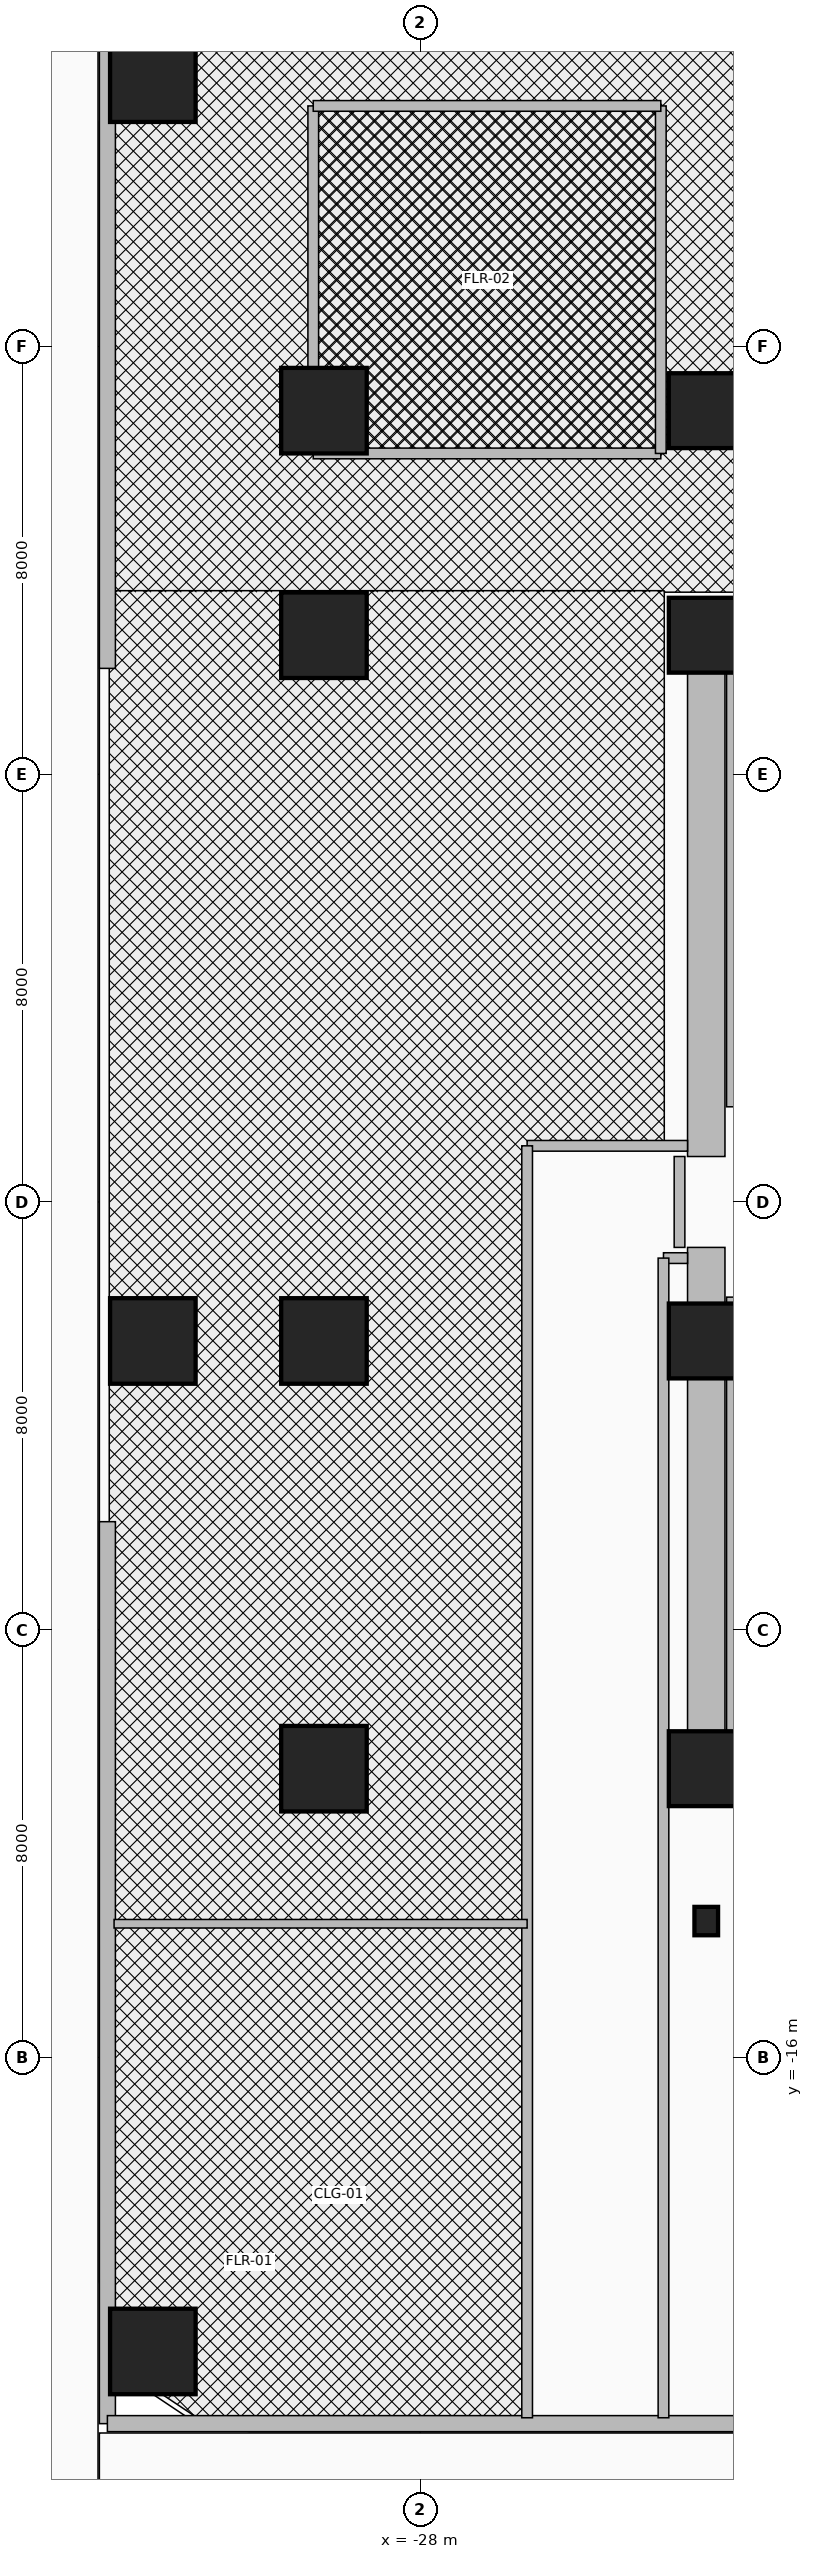
"""IFC4 building model, lengths in metres.
Left out: names, types, materials, properties, quantities, classifications, styles, units other than length and angle.
Written with IfcOpenShell. Run it as: python <this file> out.ifc"""

import sys

from ifc_helpers import new_model, si_unit, direction, frame, frame_2d, origin, origin_2d, place, context, subcontext, project, spatial, rectangle, i_section, extrude, source, transform, mapped, element, fill, save


model = new_model("IFC4")
c1 = context("Model", 3, precision=1e-05, world=origin(), true_north=direction((0.0, 1.0)))
c2 = subcontext(c1, "Body", "Model", "MODEL_VIEW")
j1 = project(units=[si_unit("LENGTHUNIT", "METRE"), si_unit("PLANEANGLEUNIT", "RADIAN")], contexts=[c1])
p1 = place(None, origin())
s1 = spatial("IfcSite", under=j1, at=p1, CompositionType="ELEMENT")
p2 = place(p1, origin())
s2 = spatial("IfcBuilding", under=s1, at=p2, CompositionType="ELEMENT")
p3 = place(p2, origin())
s3 = spatial("IfcBuildingStorey", under=s2, at=p3, CompositionType="ELEMENT", Elevation=0.0)
for number, where, z_axis, x_axis in (
    (1, (-22.16, 1.78, 0.0), (0.0, 0.0, 1.0), (0.0, 1.0, 0.0)),
    (2, (-22.16, -10.45, 0.0), (0.0, 0.0, 1.0), (0.0, 1.0, 0.0)),
):
    element("IfcWall", number, at=place(p3, frame(where, z_axis=z_axis, x_axis=x_axis)), inside=s3, PredefinedType="SHEAR", context=c2, shape_type="SweptSolid", body=[
        extrude(rectangle(XDim=8.67, YDim=0.22, at=frame_2d((4.335, 0.0))), origin(), (0.0, 0.0, 1.0), 4.92),
    ])
for number, where, z_axis, x_axis in (
    (3, (-22.65, -11.15, 0.0), (0.0, 0.0, 1.0), (0.0, 1.0, 0.0)),
    (4, (-22.65, 0.85, 0.0), (0.0, 0.0, 1.0), (0.0, 1.0, 0.0)),
):
    element("IfcWall", number, at=place(p3, frame(where, z_axis=z_axis, x_axis=x_axis)), inside=s3, PredefinedType="SHEAR", context=c2, shape_type="SweptSolid", body=[
        extrude(rectangle(XDim=10.3, YDim=0.7, at=frame_2d((5.15, 0.0))), origin(), (0.0, 0.0, 1.0), 4.92),
    ])
for number, where, z_axis, x_axis in (
    (5, (-22.65, 10.8, 0.0), (0.0, 0.0, 1.0), (1.0, 0.0, 0.0)),
    (6, (-22.65, -10.8, 0.0), (0.0, 0.0, 1.0), (1.0, 0.0, 0.0)),
):
    element("IfcWall", number, at=place(p3, frame(where, z_axis=z_axis, x_axis=x_axis)), inside=s3, PredefinedType="SHEAR", context=c2, shape_type="SweptSolid", body=[
        extrude(rectangle(XDim=10.25, YDim=0.7, at=frame_2d((5.125, 0.0))), origin(), (0.0, 0.0, 1.0), 4.92),
    ])
m1 = source(origin(), c2, "Body", "SweptSolid", [
    extrude(rectangle(XDim=1.6, YDim=1.6, at=origin_2d()), origin(), (0.0, 0.0, 1.0), 5.2),
])
p4 = place(p3, frame((-29.8, -10.6, 0.0), z_axis=(0.0, 0.0, 1.0), x_axis=(1.0, 0.0, 0.0)))
e7 = element("IfcColumn", 7, at=p4, inside=s3, PredefinedType="COLUMN", context=c2, shape_type="MappedRepresentation", body=[
    mapped(m1, transform((0.0, 0.0, 0.0), x_axis=(1.0, 0.0, 0.0), y_axis=(0.0, 1.0, 0.0), z_axis=(0.0, 0.0, 1.0), scale=1.0)),
])
m2 = source(origin(), c2, "Body", "SweptSolid", [
    extrude(rectangle(XDim=1.4, YDim=1.4, at=origin_2d()), origin(), (0.0, 0.0, 1.0), 5.2),
])
p5 = place(p3, frame((-22.65, -10.6, 0.0), z_axis=(0.0, 0.0, 1.0), x_axis=(1.0, 0.0, 0.0)))
e8 = element("IfcColumn", 8, at=p5, inside=s3, PredefinedType="COLUMN", context=c2, shape_type="MappedRepresentation", body=[
    mapped(m2, transform((0.0, 0.0, 0.0), x_axis=(1.0, 0.0, 0.0), y_axis=(0.0, 1.0, 0.0), z_axis=(0.0, 0.0, 1.0), scale=1.0)),
])
p6 = place(p3, frame((-29.8, -2.6, 0.0), z_axis=(0.0, 0.0, 1.0), x_axis=(1.0, 0.0, 0.0)))
e9 = element("IfcColumn", 9, at=p6, inside=s3, PredefinedType="COLUMN", context=c2, shape_type="MappedRepresentation", body=[
    mapped(m1, transform((0.0, 0.0, 0.0), x_axis=(1.0, 0.0, 0.0), y_axis=(0.0, 1.0, 0.0), z_axis=(0.0, 0.0, 1.0), scale=1.0)),
])
p7 = place(p3, frame((-22.65, -2.6, 0.0), z_axis=(0.0, 0.0, 1.0), x_axis=(1.0, 0.0, 0.0)))
e10 = element("IfcColumn", 10, at=p7, inside=s3, PredefinedType="COLUMN", context=c2, shape_type="MappedRepresentation", body=[
    mapped(m2, transform((0.0, 0.0, 0.0), x_axis=(1.0, 0.0, 0.0), y_axis=(0.0, 1.0, 0.0), z_axis=(0.0, 0.0, 1.0), scale=1.0)),
])
p8 = place(p3, frame((-29.8, 10.6, 0.0), z_axis=(0.0, 0.0, 1.0), x_axis=(1.0, 0.0, 0.0)))
e11 = element("IfcColumn", 11, at=p8, inside=s3, PredefinedType="COLUMN", context=c2, shape_type="MappedRepresentation", body=[
    mapped(m1, transform((0.0, 0.0, 0.0), x_axis=(1.0, 0.0, 0.0), y_axis=(0.0, 1.0, 0.0), z_axis=(0.0, 0.0, 1.0), scale=1.0)),
])
p9 = place(p3, frame((-22.65, 10.6, 0.0), z_axis=(0.0, 0.0, 1.0), x_axis=(1.0, 0.0, 0.0)))
e12 = element("IfcColumn", 12, at=p9, inside=s3, PredefinedType="COLUMN", context=c2, shape_type="MappedRepresentation", body=[
    mapped(m2, transform((0.0, 0.0, 0.0), x_axis=(1.0, 0.0, 0.0), y_axis=(0.0, 1.0, 0.0), z_axis=(0.0, 0.0, 1.0), scale=1.0)),
])
p10 = place(p3, frame((-29.8, 14.8, 0.0), z_axis=(0.0, 0.0, 1.0), x_axis=(1.0, 0.0, 0.0)))
e13 = element("IfcColumn", 13, at=p10, inside=s3, PredefinedType="COLUMN", context=c2, shape_type="MappedRepresentation", body=[
    mapped(m1, transform((0.0, 0.0, 0.0), x_axis=(1.0, 0.0, 0.0), y_axis=(0.0, 1.0, 0.0), z_axis=(0.0, 0.0, 1.0), scale=1.0)),
])
p11 = place(p3, frame((-22.65, 14.8, 0.0), z_axis=(0.0, 0.0, 1.0), x_axis=(1.0, 0.0, 0.0)))
e14 = element("IfcColumn", 14, at=p11, inside=s3, PredefinedType="COLUMN", context=c2, shape_type="MappedRepresentation", body=[
    mapped(m2, transform((0.0, 0.0, 0.0), x_axis=(1.0, 0.0, 0.0), y_axis=(0.0, 1.0, 0.0), z_axis=(0.0, 0.0, 1.0), scale=1.0)),
])
m3 = source(origin(), c2, "Body", "SweptSolid", [
    extrude(i_section(OverallWidth=0.442, OverallDepth=0.531, WebThickness=0.066, FlangeThickness=0.106, at=origin_2d()), origin(), (0.0, 0.0, 1.0), 5.2),
])
p12 = place(p3, frame((-22.65, -13.45, 0.0), z_axis=(0.0, 0.0, 1.0), x_axis=(1.0, 0.0, 0.0)))
e15 = element("IfcColumn", 15, at=p12, inside=s3, PredefinedType="COLUMN", context=c2, shape_type="MappedRepresentation", body=[
    mapped(m3, transform((0.0, 0.0, 0.0), x_axis=(1.0, 0.0, 0.0), y_axis=(0.0, 1.0, 0.0), z_axis=(0.0, 0.0, 1.0), scale=1.0)),
])
for number, where, z_axis, x_axis in (
    (16, (-33.0, -21.5, 0.0), (0.0, 0.0, 1.0), (1.0, 0.0, 0.0)),
    (17, (-33.0, -2.6, 0.0), (0.0, 0.0, 1.0), (1.0, 0.0, 0.0)),
    (18, (-33.0, 21.0, 0.0), (0.0, 0.0, 1.0), (1.0, 0.0, 0.0)),
):
    element("IfcColumn", number, at=place(p3, frame(where, z_axis=z_axis, x_axis=x_axis)), inside=s3, PredefinedType="COLUMN", context=c2, shape_type="MappedRepresentation", body=[
        mapped(m1, transform((0.0, 0.0, 0.0), x_axis=(1.0, 0.0, 0.0), y_axis=(0.0, 1.0, 0.0), z_axis=(0.0, 0.0, 1.0), scale=1.0)),
    ])
p13 = place(p3, frame((-33.85, -22.85, 0.0), z_axis=(0.0, 0.0, 1.0), x_axis=(0.0, 1.0, 0.0)))
e19 = element("IfcWall", 19, at=p13, inside=s3, PredefinedType="SOLIDWALL", context=c2, shape_type="SweptSolid", body=[
    extrude(rectangle(XDim=16.87, YDim=0.3, at=frame_2d((8.435, 0.0))), origin(), (0.0, 0.0, 1.0), 4.92),
])
p14 = place(p13, frame((11.2, 0.0, 0.0)))
e20 = element("IfcOpeningElement", 20, at=p14, cuts=e19, PredefinedType="OPENING", context=c2, shape_type="SweptSolid", body=[
    extrude(rectangle(XDim=1.8, YDim=2.2, at=frame_2d((0.9, 1.1))), frame((0.0, 0.165, 0.0), z_axis=(0.0, -1.0, 0.0), x_axis=(1.0, 0.0, 0.0)), (0.0, 0.0, 1.0), 0.33),
])
p15 = place(p3, frame((-33.85, 9.98, 0.0), z_axis=(0.0, 0.0, 1.0), x_axis=(0.0, 1.0, 0.0)))
e21 = element("IfcWall", 21, at=p15, inside=s3, PredefinedType="SOLIDWALL", context=c2, shape_type="SweptSolid", body=[
    extrude(rectangle(XDim=12.87, YDim=0.3, at=frame_2d((6.435, 0.0))), origin(), (0.0, 0.0, 1.0), 4.92),
])
p16 = place(p3, frame((-33.85, -22.85, 0.0), z_axis=(0.0, 0.0, 1.0), x_axis=(1.0, 0.0, 0.0)))
e22 = element("IfcWall", 22, at=p16, inside=s3, PredefinedType="SOLIDWALL", context=c2, shape_type="SweptSolid", body=[
    extrude(rectangle(XDim=21.7, YDim=0.3, at=frame_2d((10.85, 0.0))), origin(), (0.0, 0.0, 1.0), 4.92),
])
p17 = place(p16, frame((3.2, 0.0, 0.0)))
e23 = element("IfcOpeningElement", 23, at=p17, cuts=e22, PredefinedType="OPENING", context=c2, shape_type="SweptSolid", body=[
    extrude(rectangle(XDim=2.2, YDim=2.45, at=frame_2d((1.1, 1.225))), frame((0.0, 0.165, 0.0), z_axis=(0.0, -1.0, 0.0), x_axis=(1.0, 0.0, 0.0)), (0.0, 0.0, 1.0), 0.33),
])
p18 = place(p16, frame((8.225, 0.0, 0.0)))
e24 = element("IfcOpeningElement", 24, at=p18, cuts=e22, PredefinedType="OPENING", context=c2, shape_type="SweptSolid", body=[
    extrude(rectangle(XDim=1.8, YDim=2.2, at=frame_2d((0.9, 1.1))), frame((0.0, 0.165, 0.0), z_axis=(0.0, -1.0, 0.0), x_axis=(1.0, 0.0, 0.0)), (0.0, 0.0, 1.0), 0.33),
])
p19 = place(p3, frame((-23.15, -0.85, 0.0), z_axis=(0.0, 0.0, 1.0), x_axis=(0.0, 1.0, 0.0)))
e25 = element("IfcWall", 25, at=p19, inside=s3, PredefinedType="PARTITIONING", context=c2, shape_type="SweptSolid", body=[
    extrude(rectangle(XDim=1.7, YDim=0.2, at=frame_2d((0.85, 0.0))), origin(), (0.0, 0.0, 1.0), 4.439),
])
p20 = place(p19, frame((0.325, 0.0, 0.0)))
e26 = element("IfcOpeningElement", 26, at=p20, cuts=e25, PredefinedType="OPENING", context=c2, shape_type="SweptSolid", body=[
    extrude(rectangle(XDim=1.05, YDim=2.15, at=frame_2d((0.525, 1.075))), frame((0.0, 0.115, 0.0), z_axis=(0.0, -1.0, 0.0), x_axis=(1.0, 0.0, 0.0)), (0.0, 0.0, 1.0), 0.23),
])
p21 = place(p3, frame((-26.0, 1.05, 0.0), z_axis=(0.0, 0.0, 1.0), x_axis=(1.0, 0.0, 0.0)))
e27 = element("IfcWall", 27, at=p21, inside=s3, PredefinedType="PARTITIONING", context=c2, shape_type="SweptSolid", body=[
    extrude(rectangle(XDim=3.0, YDim=0.2, at=frame_2d((1.5, 0.0))), origin(), (0.0, 0.0, 1.0), 4.92),
])
p22 = place(p3, frame((-23.45, -1.05, 0.0), z_axis=(0.0, 0.0, 1.0), x_axis=(1.0, 0.0, 0.0)))
e28 = element("IfcWall", 28, at=p22, inside=s3, PredefinedType="PARTITIONING", context=c2, shape_type="SweptSolid", body=[
    extrude(rectangle(XDim=0.45, YDim=0.2, at=frame_2d((0.225, 0.0))), origin(), (0.0, 0.0, 1.0), 4.92),
])
p23 = place(p3, frame((-26.0, -22.74, 0.0), z_axis=(0.0, 0.0, 1.0), x_axis=(0.0, 1.0, 0.0)))
e29 = element("IfcWall", 29, at=p23, inside=s3, PredefinedType="PARTITIONING", context=c2, shape_type="SweptSolid", body=[
    extrude(rectangle(XDim=23.79, YDim=0.2, at=frame_2d((11.895, 0.0))), origin(), (0.0, 0.0, 1.0), 3.957),
])
p24 = place(p3, frame((-23.45, -22.74, 0.0), z_axis=(0.0, 0.0, 1.0), x_axis=(0.0, 1.0, 0.0)))
e30 = element("IfcWall", 30, at=p24, inside=s3, PredefinedType="PARTITIONING", context=c2, shape_type="SweptSolid", body=[
    extrude(rectangle(XDim=21.69, YDim=0.2, at=frame_2d((10.845, 0.0))), origin(), (0.0, 0.0, 1.0), 3.957),
])
p25 = place(p3, frame((-33.725, -13.5, 0.0), z_axis=(0.0, 0.0, 1.0), x_axis=(1.0, 0.0, 0.0)))
e31 = element("IfcWall", 31, at=p25, inside=s3, PredefinedType="PARTITIONING", context=c2, shape_type="SweptSolid", body=[
    extrude(rectangle(XDim=7.725, YDim=0.16, at=frame_2d((3.863, 0.0))), origin(), (0.0, 0.0, 1.0), 4.356),
])
p26 = place(p25, frame((1.2, 0.0, 0.0)))
e32 = element("IfcOpeningElement", 32, at=p26, cuts=e31, PredefinedType="OPENING", context=c2, shape_type="SweptSolid", body=[
    extrude(rectangle(XDim=1.8, YDim=2.15, at=frame_2d((0.9, 1.075))), frame((0.0, 0.095, 0.0), z_axis=(0.0, -1.0, 0.0), x_axis=(1.0, 0.0, 0.0)), (0.0, 0.0, 1.0), 0.19),
])
p27 = place(p3, frame((-30.0, 14.0, 0.0), z_axis=(0.0, 0.0, 1.0), x_axis=(1.0, 0.0, 0.0)))
e33 = element("IfcWall", 33, at=p27, inside=s3, PredefinedType="PARTITIONING", context=c2, shape_type="SweptSolid", body=[
    extrude(rectangle(XDim=6.5, YDim=0.2, at=frame_2d((3.25, 0.0))), origin(), (0.0, 0.0, 1.0), 4.356),
])
p28 = place(p27, frame((2.5, 0.0, 0.0)))
e34 = element("IfcOpeningElement", 34, at=p28, cuts=e33, PredefinedType="OPENING", context=c2, shape_type="SweptSolid", body=[
    extrude(rectangle(XDim=1.05, YDim=2.15, at=frame_2d((0.525, 1.075))), frame((0.0, 0.115, 0.0), z_axis=(0.0, -1.0, 0.0), x_axis=(1.0, 0.0, 0.0)), (0.0, 0.0, 1.0), 0.23),
])
p29 = place(p3, frame((-30.0, 14.0, 0.0), z_axis=(0.0, 0.0, 1.0), x_axis=(0.0, 1.0, 0.0)))
e35 = element("IfcWall", 35, at=p29, inside=s3, PredefinedType="PARTITIONING", context=c2, shape_type="SweptSolid", body=[
    extrude(rectangle(XDim=6.5, YDim=0.2, at=frame_2d((3.25, 0.0))), origin(), (0.0, 0.0, 1.0), 4.356),
])
p30 = place(p3, frame((-23.5, 14.0, 0.0), z_axis=(0.0, 0.0, 1.0), x_axis=(0.0, 1.0, 0.0)))
e36 = element("IfcWall", 36, at=p30, inside=s3, PredefinedType="PARTITIONING", context=c2, shape_type="SweptSolid", body=[
    extrude(rectangle(XDim=6.5, YDim=0.2, at=frame_2d((3.25, 0.0))), origin(), (0.0, 0.0, 1.0), 3.957),
])
p31 = place(p3, frame((-30.0, 20.5, 0.0), z_axis=(0.0, 0.0, 1.0), x_axis=(1.0, 0.0, 0.0)))
e37 = element("IfcWall", 37, at=p31, inside=s3, PredefinedType="PARTITIONING", context=c2, shape_type="SweptSolid", body=[
    extrude(rectangle(XDim=6.5, YDim=0.2, at=frame_2d((3.25, 0.0))), origin(), (0.0, 0.0, 1.0), 4.92),
])
p32 = place(p17, frame((2.2, 0.0, 0.0), z_axis=(0.0, 0.0, 1.0), x_axis=(-1.0, 0.0, 0.0)))
e38 = element("IfcDoor", 38, at=p32, inside=s3, OperationType="SINGLE_SWING_LEFT", PredefinedType="DOOR", context=c2, shape_type="SweptSolid", body=[
    extrude(rectangle(XDim=2.2, YDim=2.45, at=frame_2d((1.1, 1.225))), frame((0.0, 0.025, 0.0), z_axis=(0.0, -1.0, 0.0), x_axis=(1.0, 0.0, 0.0)), (0.0, 0.0, 1.0), 0.05),
])
fill(e23, e38)
p33 = place(p18, frame((1.8, 0.0, 0.0), z_axis=(0.0, 0.0, 1.0), x_axis=(-1.0, 0.0, 0.0)))
e39 = element("IfcDoor", 39, at=p33, inside=s3, OperationType="SINGLE_SWING_LEFT", PredefinedType="DOOR", context=c2, shape_type="SweptSolid", body=[
    extrude(rectangle(XDim=1.8, YDim=2.2, at=frame_2d((0.9, 1.1))), frame((0.0, 0.025, 0.0), z_axis=(0.0, -1.0, 0.0), x_axis=(1.0, 0.0, 0.0)), (0.0, 0.0, 1.0), 0.05),
])
fill(e24, e39)
p34 = place(p14, origin())
e40 = element("IfcDoor", 40, at=p34, inside=s3, OperationType="SINGLE_SWING_LEFT", PredefinedType="DOOR", context=c2, shape_type="SweptSolid", body=[
    extrude(rectangle(XDim=1.8, YDim=2.2, at=frame_2d((0.9, 1.1))), frame((0.0, 0.025, 0.0), z_axis=(0.0, -1.0, 0.0), x_axis=(1.0, 0.0, 0.0)), (0.0, 0.0, 1.0), 0.05),
])
fill(e20, e40)
p35 = place(p20, origin())
e41 = element("IfcDoor", 41, at=p35, inside=s3, OperationType="SINGLE_SWING_LEFT", PredefinedType="DOOR", context=c2, shape_type="SweptSolid", body=[
    extrude(rectangle(XDim=1.05, YDim=2.15, at=frame_2d((0.525, 1.075))), frame((0.0, 0.025, 0.0), z_axis=(0.0, -1.0, 0.0), x_axis=(1.0, 0.0, 0.0)), (0.0, 0.0, 1.0), 0.05),
])
fill(e26, e41)
p36 = place(p26, origin())
e42 = element("IfcDoor", 42, at=p36, inside=s3, OperationType="DOUBLE_DOOR_SINGLE_SWING", PredefinedType="DOOR", context=c2, shape_type="SweptSolid", body=[
    extrude(rectangle(XDim=1.8, YDim=2.15, at=frame_2d((0.9, 1.075))), frame((0.0, 0.025, 0.0), z_axis=(0.0, -1.0, 0.0), x_axis=(1.0, 0.0, 0.0)), (0.0, 0.0, 1.0), 0.05),
])
fill(e32, e42)
p37 = place(p28, frame((1.05, 0.0, 0.0), z_axis=(0.0, 0.0, 1.0), x_axis=(-1.0, 0.0, 0.0)))
e43 = element("IfcDoor", 43, at=p37, inside=s3, OperationType="SINGLE_SWING_LEFT", PredefinedType="DOOR", context=c2, shape_type="SweptSolid", body=[
    extrude(rectangle(XDim=1.05, YDim=2.15, at=frame_2d((0.525, 1.075))), frame((0.0, 0.025, 0.0), z_axis=(0.0, -1.0, 0.0), x_axis=(1.0, 0.0, 0.0)), (0.0, 0.0, 1.0), 0.05),
])
fill(e34, e43)
save(model, sys.argv[1])
